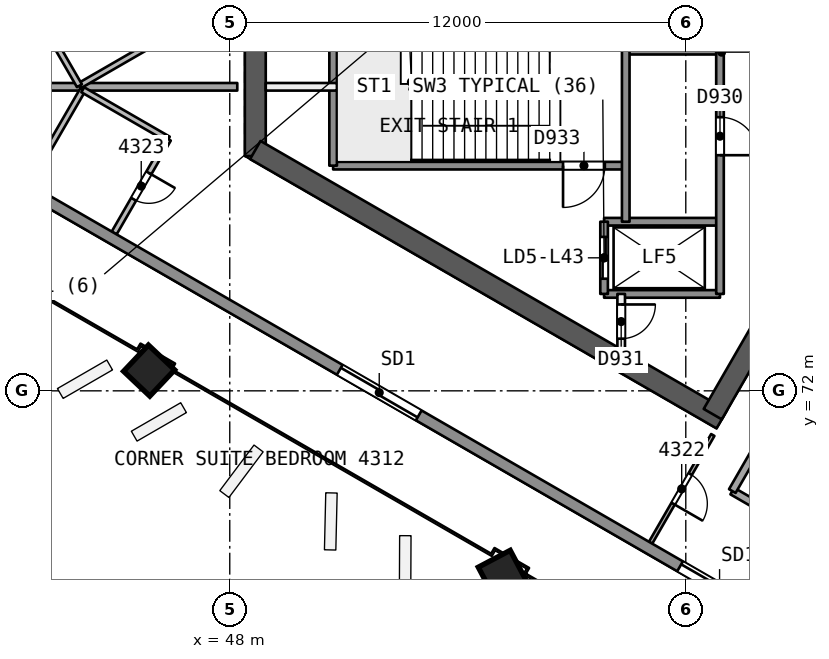
"""IFC4 building model, lengths in metres.
Left out: names, types, materials, properties, quantities, classifications, styles, units other than length and angle.
Written with IfcOpenShell. Run it as: python <this file> out.ifc"""

import sys

from ifc_helpers import new_model, si_unit, direction, frame, frame_2d, origin, origin_2d, place, context, subcontext, project, spatial, rectangle, extrude, element, fill, save


model = new_model("IFC4")
c1 = context("Model", 3, precision=1e-05, world=origin(), true_north=direction((0.0, 1.0)))
c2 = subcontext(c1, "Body", "Model", "MODEL_VIEW")
j1 = project(units=[si_unit("LENGTHUNIT", "METRE"), si_unit("PLANEANGLEUNIT", "RADIAN")], contexts=[c1])
p1 = place(None, origin())
s1 = spatial("IfcSite", under=j1, at=p1, CompositionType="ELEMENT")
p2 = place(p1, origin())
s2 = spatial("IfcBuilding", under=s1, at=p2, CompositionType="ELEMENT")
p3 = place(p2, frame((0.0, 0.0, 178.5)))
s3 = spatial("IfcBuildingStorey", under=s2, at=p3, CompositionType="ELEMENT", Elevation=178.5)
p4 = place(p3, frame((65.682, 80.0, 0.0), z_axis=(0.0, 0.0, 1.0), x_axis=(-0.500000202252, 0.866025287014, 0.0)))
e1 = element("IfcWall", 1, at=p4, inside=s3, PredefinedType="SHEAR", context=c2, shape_type="SweptSolid", body=[
    extrude(rectangle(XDim=10.221, YDim=0.55, at=frame_2d((5.111, 0.0))), origin(), (0.0, 0.0, 1.0), 3.7),
])
p5 = place(p4, frame((0.791, 0.0, 0.0)))
e2 = element("IfcOpeningElement", 2, at=p5, cuts=e1, PredefinedType="OPENING", context=c2, shape_type="SweptSolid", body=[
    extrude(rectangle(XDim=1.2, YDim=2.1, at=frame_2d((0.6, 1.05))), frame((0.0, 0.286, 0.0), z_axis=(0.0, -1.0, 0.0), x_axis=(1.0, 0.0, 0.0)), (0.0, 0.0, 1.0), 0.571),
])
p6 = place(p3, frame((48.672, 81.664, 0.0), z_axis=(0.0, 0.0, 1.0), x_axis=(0.0, -1.0, 0.0)))
e3 = element("IfcWall", 3, at=p6, inside=s3, PredefinedType="SHEAR", context=c2, shape_type="SweptSolid", body=[
    extrude(rectangle(XDim=3.487, YDim=0.55, at=frame_2d((1.743, 0.0))), origin(), (0.0, 0.0, 1.0), 3.7),
])
p7 = place(p3, frame((48.672, 78.336, 0.0), z_axis=(0.0, 0.0, 1.0), x_axis=(0.866023530946, -0.500003243837, 0.0)))
e4 = element("IfcWall", 4, at=p7, inside=s3, PredefinedType="SHEAR", context=c2, shape_type="SweptSolid", body=[
    extrude(rectangle(XDim=14.175, YDim=0.55, at=frame_2d((7.087, 0.0))), origin(), (0.0, 0.0, 1.0), 3.7),
])
p8 = place(p3, frame((60.709, 71.386, 0.0), z_axis=(0.0, 0.0, 1.0), x_axis=(0.500015938302, 0.866016201606, 0.0)))
e5 = element("IfcWall", 5, at=p8, inside=s3, PredefinedType="SHEAR", context=c2, shape_type="SweptSolid", body=[
    extrude(rectangle(XDim=10.105, YDim=0.55, at=frame_2d((5.053, 0.0))), origin(), (0.0, 0.0, 1.0), 3.7),
])
p9 = place(p8, frame((7.955, 0.0, 0.0)))
e6 = element("IfcOpeningElement", 6, at=p9, cuts=e5, PredefinedType="OPENING", context=c2, shape_type="SweptSolid", body=[
    extrude(rectangle(XDim=1.2, YDim=2.1, at=frame_2d((0.6, 1.05))), frame((0.0, 0.286, 0.0), z_axis=(0.0, -1.0, 0.0), x_axis=(1.0, 0.0, 0.0)), (0.0, 0.0, 1.0), 0.571),
])
p10 = place(p3, frame((45.844, 72.525, 0.0), z_axis=(0.02855911485, 0.006793507689, 0.999569019734), x_axis=(-0.865320906072, 0.500764600817, 0.021320039488)))
e7 = element("IfcColumn", 7, at=p10, inside=s3, PredefinedType="COLUMN", context=c2, shape_type="SweptSolid", body=[
    extrude(rectangle(XDim=0.95, YDim=0.95, at=origin_2d()), origin(), (0.0, 0.0, 1.0), 3.702),
])
p11 = place(p3, frame((55.159, 67.147, 0.0), z_axis=(0.019328516974, 0.012138044789, 0.999739504221), x_axis=(-0.865689041461, 0.500468616527, 0.010660551878)))
e8 = element("IfcColumn", 8, at=p11, inside=s3, PredefinedType="COLUMN", context=c2, shape_type="SweptSolid", body=[
    extrude(rectangle(XDim=0.95, YDim=0.95, at=origin_2d()), origin(), (0.0, 0.0, 1.0), 3.701),
])
p12 = place(p3, frame((46.296, 81.328, 0.0), z_axis=(0.0, 0.0, 1.0), x_axis=(-0.866021400173, -0.500006934395, 0.0)))
e9 = element("IfcWall", 9, at=p12, inside=s3, PredefinedType="PARTITIONING", context=c2, shape_type="SweptSolid", body=[
    extrude(rectangle(XDim=2.6, YDim=0.15, at=frame_2d((1.3, 0.0))), origin(), (0.0, 0.0, 1.0), 3.25),
])
p13 = place(p3, frame((44.045, 80.028, 0.0), z_axis=(0.0, 0.0, 1.0), x_axis=(-0.499960165064, 0.866048401274, 0.0)))
e10 = element("IfcWall", 10, at=p13, inside=s3, PredefinedType="PARTITIONING", context=c2, shape_type="SweptSolid", body=[
    extrude(rectangle(XDim=2.371, YDim=0.15, at=frame_2d((1.186, 0.0))), origin(), (0.0, 0.0, 1.0), 3.25),
])
p14 = place(p3, frame((42.859, 80.0, 0.0), z_axis=(0.0, 0.0, 1.0), x_axis=(1.0, 0.0, 0.0)))
e11 = element("IfcWall", 11, at=p14, inside=s3, PredefinedType="PARTITIONING", context=c2, shape_type="SweptSolid", body=[
    extrude(rectangle(XDim=5.339, YDim=0.2, at=frame_2d((2.669, 0.0))), origin(), (0.0, 0.0, 1.0), 3.25),
])
p15 = place(p3, frame((60.71, 70.838, 0.0), z_axis=(0.0, 0.0, 1.0), x_axis=(-0.499980647919, -0.866036576425, 0.0)))
e12 = element("IfcWall", 12, at=p15, inside=s3, PredefinedType="PARTITIONING", context=c2, shape_type="SweptSolid", body=[
    extrude(rectangle(XDim=3.274, YDim=0.1, at=frame_2d((1.637, 0.0))), origin(), (0.0, 0.0, 1.0), 3.25),
])
p16 = place(p15, frame((1.187, 0.0, 0.0)))
e13 = element("IfcOpeningElement", 13, at=p16, cuts=e12, PredefinedType="OPENING", context=c2, shape_type="SweptSolid", body=[
    extrude(rectangle(XDim=0.9, YDim=2.1, at=frame_2d((0.45, 1.05))), frame((0.0, 0.061, 0.0), z_axis=(0.0, -1.0, 0.0), x_axis=(1.0, 0.0, 0.0)), (0.0, 0.0, 1.0), 0.121),
])
p17 = place(p3, frame((62.956, 68.363, 0.0), z_axis=(0.0, 0.0, 1.0), x_axis=(-0.866041268327, 0.499972520799, 0.0)))
e14 = element("IfcWall", 14, at=p17, inside=s3, PredefinedType="PARTITIONING", context=c2, shape_type="SweptSolid", body=[
    extrude(rectangle(XDim=2.0, YDim=0.2, at=frame_2d((1.0, 0.0))), origin(), (0.0, 0.0, 1.0), 3.25),
])
p18 = place(p3, frame((61.224, 69.363, 0.0), z_axis=(0.0, 0.0, 1.0), x_axis=(0.499990139034, 0.866031096941, 0.0)))
e15 = element("IfcWall", 15, at=p18, inside=s3, PredefinedType="PARTITIONING", context=c2, shape_type="SweptSolid", body=[
    extrude(rectangle(XDim=9.0, YDim=0.2, at=frame_2d((4.5, 0.0))), origin(), (0.0, 0.0, 1.0), 3.25),
])
p19 = place(p3, frame((42.859, 77.718, 0.0), z_axis=(0.0, 0.0, 1.0), x_axis=(0.499935570486, 0.866062598986, 0.0)))
e16 = element("IfcWall", 16, at=p19, inside=s3, PredefinedType="PARTITIONING", context=c2, shape_type="SweptSolid", body=[
    extrude(rectangle(XDim=2.545, YDim=0.15, at=frame_2d((1.272, 0.0))), origin(), (0.0, 0.0, 1.0), 3.25),
])
p20 = place(p3, frame((44.132, 79.922, 0.0), z_axis=(0.0, 0.0, 1.0), x_axis=(0.866021400173, -0.500006934395, 0.0)))
e17 = element("IfcWall", 17, at=p20, inside=s3, PredefinedType="PARTITIONING", context=c2, shape_type="SweptSolid", body=[
    extrude(rectangle(XDim=2.6, YDim=0.15, at=frame_2d((1.3, 0.0))), origin(), (0.0, 0.0, 1.0), 3.25),
])
p21 = place(p3, frame((46.384, 78.622, 0.0), z_axis=(0.0, 0.0, 1.0), x_axis=(-0.500006551472, -0.866021621257, 0.0)))
e18 = element("IfcWall", 18, at=p21, inside=s3, PredefinedType="PARTITIONING", context=c2, shape_type="SweptSolid", body=[
    extrude(rectangle(XDim=2.852, YDim=0.15, at=frame_2d((1.426, 0.0))), origin(), (0.0, 0.0, 1.0), 3.25),
])
p22 = place(p21, frame((1.026, 0.0, 0.0)))
e19 = element("IfcOpeningElement", 19, at=p22, cuts=e18, PredefinedType="OPENING", context=c2, shape_type="SweptSolid", body=[
    extrude(rectangle(XDim=0.8, YDim=2.1, at=frame_2d((0.4, 1.05))), frame((0.0, 0.085, 0.0), z_axis=(0.0, -1.0, 0.0), x_axis=(1.0, 0.0, 0.0)), (0.0, 0.0, 1.0), 0.171),
])
p23 = place(p3, frame((88.788, 50.676, 0.0), z_axis=(0.0, 0.0, 1.0), x_axis=(-0.866026647012, 0.499997846661, 0.0)))
e20 = element("IfcWall", 20, at=p23, inside=s3, PredefinedType="SOLIDWALL", context=c2, shape_type="SweptSolid", body=[
    extrude(rectangle(XDim=53.206, YDim=0.3, at=frame_2d((26.603, 0.0))), origin(), (0.0, 0.0, 1.0), 3.25),
])
p24 = place(p23, frame((31.015, 0.0, 0.0)))
e21 = element("IfcOpeningElement", 21, at=p24, cuts=e20, PredefinedType="OPENING", context=c2, shape_type="SweptSolid", body=[
    extrude(rectangle(XDim=2.4, YDim=2.4, at=frame_2d((1.2, 1.2))), frame((0.0, 0.161, 0.0), z_axis=(0.0, -1.0, 0.0), x_axis=(1.0, 0.0, 0.0)), (0.0, 0.0, 1.0), 0.321),
])
p25 = place(p23, frame((41.356, 0.0, 0.0)))
e22 = element("IfcOpeningElement", 22, at=p25, cuts=e20, PredefinedType="OPENING", context=c2, shape_type="SweptSolid", body=[
    extrude(rectangle(XDim=2.4, YDim=2.4, at=frame_2d((1.2, 1.2))), frame((0.0, 0.161, 0.0), z_axis=(0.0, -1.0, 0.0), x_axis=(1.0, 0.0, 0.0)), (0.0, 0.0, 1.0), 0.321),
])
p26 = place(p23, frame((20.726, 0.0, 0.0)))
e23 = element("IfcOpeningElement", 23, at=p26, cuts=e20, PredefinedType="OPENING", context=c2, shape_type="SweptSolid", body=[
    extrude(rectangle(XDim=2.4, YDim=2.4, at=frame_2d((1.2, 1.2))), frame((0.0, 0.161, 0.0), z_axis=(0.0, -1.0, 0.0), x_axis=(1.0, 0.0, 0.0)), (0.0, 0.0, 1.0), 0.321),
])
p27 = place(p23, frame((9.4, 0.0, 0.0)))
e24 = element("IfcOpeningElement", 24, at=p27, cuts=e20, PredefinedType="OPENING", context=c2, shape_type="SweptSolid", body=[
    extrude(rectangle(XDim=2.4, YDim=2.4, at=frame_2d((1.2, 1.2))), frame((0.0, 0.161, 0.0), z_axis=(0.0, -1.0, 0.0), x_axis=(1.0, 0.0, 0.0)), (0.0, 0.0, 1.0), 0.321),
])
p28 = place(p23, frame((26.338, 0.0, 0.0)))
e25 = element("IfcOpeningElement", 25, at=p28, cuts=e20, PredefinedType="OPENING", context=c2, shape_type="SweptSolid", body=[
    extrude(rectangle(XDim=2.4, YDim=2.4, at=frame_2d((1.2, 1.2))), frame((0.0, 0.161, 0.0), z_axis=(0.0, -1.0, 0.0), x_axis=(1.0, 0.0, 0.0)), (0.0, 0.0, 1.0), 0.321),
])
p29 = place(p3, frame((60.9, 80.95, 0.0), z_axis=(0.0, 0.0, 1.0), x_axis=(-1.0, 0.0, 0.0)))
e26 = element("IfcWall", 26, at=p29, inside=s3, PredefinedType="SOLIDWALL", context=c2, shape_type="SweptSolid", body=[
    extrude(rectangle(XDim=2.48, YDim=0.2, at=frame_2d((1.24, 0.0))), origin(), (0.0, 0.0, 1.0), 3.25),
])
p30 = place(p3, frame((50.82, 80.0, 0.0), z_axis=(0.0, 0.0, 1.0), x_axis=(-1.0, 0.0, 0.0)))
e27 = element("IfcWall", 27, at=p30, inside=s3, PredefinedType="PARTITIONING", context=c2, shape_type="SweptSolid", body=[
    extrude(rectangle(XDim=1.873, YDim=0.2, at=frame_2d((0.937, 0.0))), origin(), (0.0, 0.0, 1.0), 3.25),
])
p31 = place(p3, frame((58.42, 77.925, 0.0), z_axis=(0.0, 0.0, 1.0), x_axis=(-1.0, 0.0, 0.0)))
e28 = element("IfcWall", 28, at=p31, inside=s3, PredefinedType="SOLIDWALL", context=c2, shape_type="SweptSolid", body=[
    extrude(rectangle(XDim=7.7, YDim=0.2, at=frame_2d((3.85, 0.0))), origin(), (0.0, 0.0, 1.0), 3.25),
])
p32 = place(p31, frame((0.55, 0.0, 0.0)))
e29 = element("IfcOpeningElement", 29, at=p32, cuts=e28, PredefinedType="OPENING", context=c2, shape_type="SweptSolid", body=[
    extrude(rectangle(XDim=1.1, YDim=2.1, at=frame_2d((0.55, 1.05))), frame((0.0, 0.11, 0.0), z_axis=(0.0, -1.0, 0.0), x_axis=(1.0, 0.0, 0.0)), (0.0, 0.0, 1.0), 0.221),
])
for number, where, z_axis, x_axis in (
    (30, (60.9, 76.45, 0.0), (0.0, 0.0, 1.0), (-1.0, 0.0, 0.0)),
    (31, (60.9, 74.55, 0.0), (0.0, 0.0, 1.0), (-1.0, 0.0, 0.0)),
):
    element("IfcWall", number, at=place(p3, frame(where, z_axis=z_axis, x_axis=x_axis)), inside=s3, PredefinedType="SOLIDWALL", context=c2, shape_type="SweptSolid", body=[
        extrude(rectangle(XDim=3.05, YDim=0.2, at=frame_2d((1.525, 0.0))), origin(), (0.0, 0.0, 1.0), 3.25),
    ])
p33 = place(p3, frame((60.9, 85.45, 0.0), z_axis=(0.0, 0.0, 1.0), x_axis=(0.0, -1.0, 0.0)))
e32 = element("IfcWall", 32, at=p33, inside=s3, PredefinedType="SOLIDWALL", context=c2, shape_type="SweptSolid", body=[
    extrude(rectangle(XDim=10.9, YDim=0.2, at=frame_2d((5.45, 0.0))), origin(), (0.0, 0.0, 1.0), 3.25),
])
p34 = place(p33, frame((0.625, 0.0, 0.0)))
e33 = element("IfcOpeningElement", 33, at=p34, cuts=e32, PredefinedType="OPENING", context=c2, shape_type="SweptSolid", body=[
    extrude(rectangle(XDim=1.0, YDim=2.1, at=frame_2d((0.5, 1.05))), frame((0.0, 0.11, 0.0), z_axis=(0.0, -1.0, 0.0), x_axis=(1.0, 0.0, 0.0)), (0.0, 0.0, 1.0), 0.221),
])
p35 = place(p33, frame((2.875, 0.0, 0.0)))
e34 = element("IfcOpeningElement", 34, at=p35, cuts=e32, PredefinedType="OPENING", context=c2, shape_type="SweptSolid", body=[
    extrude(rectangle(XDim=1.0, YDim=2.1, at=frame_2d((0.5, 1.05))), frame((0.0, 0.11, 0.0), z_axis=(0.0, -1.0, 0.0), x_axis=(1.0, 0.0, 0.0)), (0.0, 0.0, 1.0), 0.221),
])
p36 = place(p33, frame((6.25, 0.0, 0.0)))
e35 = element("IfcOpeningElement", 35, at=p36, cuts=e32, PredefinedType="OPENING", context=c2, shape_type="SweptSolid", body=[
    extrude(rectangle(XDim=1.0, YDim=2.1, at=frame_2d((0.5, 1.05))), frame((0.0, 0.11, 0.0), z_axis=(0.0, -1.0, 0.0), x_axis=(1.0, 0.0, 0.0)), (0.0, 0.0, 1.0), 0.221),
])
p37 = place(p3, frame((58.42, 86.974, 0.0), z_axis=(0.0, 0.0, 1.0), x_axis=(0.0, -1.0, 0.0)))
e36 = element("IfcWall", 36, at=p37, inside=s3, PredefinedType="SOLIDWALL", context=c2, shape_type="SweptSolid", body=[
    extrude(rectangle(XDim=10.524, YDim=0.2, at=frame_2d((5.262, 0.0))), origin(), (0.0, 0.0, 1.0), 3.25),
])
p38 = place(p37, frame((0.312, 0.0, 0.0)))
e37 = element("IfcOpeningElement", 37, at=p38, cuts=e36, PredefinedType="OPENING", context=c2, shape_type="SweptSolid", body=[
    extrude(rectangle(XDim=0.9, YDim=2.1, at=frame_2d((0.45, 1.05))), frame((0.0, 0.11, 0.0), z_axis=(0.0, -1.0, 0.0), x_axis=(1.0, 0.0, 0.0)), (0.0, 0.0, 1.0), 0.221),
])
p39 = place(p3, frame((58.3, 74.55, 0.0), z_axis=(0.0, 0.0, 1.0), x_axis=(0.0, -1.0, 0.0)))
e38 = element("IfcWall", 38, at=p39, inside=s3, PredefinedType="PARTITIONING", context=c2, shape_type="SweptSolid", body=[
    extrude(rectangle(XDim=1.455, YDim=0.2, at=frame_2d((0.728, 0.0))), origin(), (0.0, 0.0, 1.0), 3.25),
])
p40 = place(p39, frame((0.278, 0.0, 0.0)))
e39 = element("IfcOpeningElement", 39, at=p40, cuts=e38, PredefinedType="OPENING", context=c2, shape_type="SweptSolid", body=[
    extrude(rectangle(XDim=0.9, YDim=2.1, at=frame_2d((0.45, 1.05))), frame((0.0, 0.11, 0.0), z_axis=(0.0, -1.0, 0.0), x_axis=(1.0, 0.0, 0.0)), (0.0, 0.0, 1.0), 0.221),
])
p41 = place(p3, frame((57.85, 76.45, 0.0), z_axis=(0.0, 0.0, 1.0), x_axis=(0.0, -1.0, 0.0)))
e40 = element("IfcWall", 40, at=p41, inside=s3, PredefinedType="SOLIDWALL", context=c2, shape_type="SweptSolid", body=[
    extrude(rectangle(XDim=1.9, YDim=0.2, at=frame_2d((0.95, 0.0))), origin(), (0.0, 0.0, 1.0), 3.25),
])
p42 = place(p41, frame((0.4, 0.0, 0.0)))
e41 = element("IfcOpeningElement", 41, at=p42, cuts=e40, PredefinedType="OPENING", context=c2, shape_type="SweptSolid", body=[
    extrude(rectangle(XDim=1.1, YDim=2.1, at=frame_2d((0.55, 1.05))), frame((0.0, 0.11, 0.0), z_axis=(0.0, -1.0, 0.0), x_axis=(1.0, 0.0, 0.0)), (0.0, 0.0, 1.0), 0.221),
])
p43 = place(p3, frame((50.72, 82.075, 0.0), z_axis=(0.0, 0.0, 1.0), x_axis=(0.0, -1.0, 0.0)))
e42 = element("IfcWall", 42, at=p43, inside=s3, PredefinedType="SOLIDWALL", context=c2, shape_type="SweptSolid", body=[
    extrude(rectangle(XDim=4.15, YDim=0.2, at=frame_2d((2.075, 0.0))), origin(), (0.0, 0.0, 1.0), 3.25),
])
p44 = place(p16, origin())
e43 = element("IfcDoor", 43, at=p44, inside=s3, OperationType="SINGLE_SWING_RIGHT", PredefinedType="NOTDEFINED", context=c2, shape_type="SweptSolid", body=[
    extrude(rectangle(XDim=0.9, YDim=2.1, at=frame_2d((0.45, 1.05))), frame((0.0, 0.025, 0.0), z_axis=(0.0, -1.0, 0.0), x_axis=(1.0, 0.0, 0.0)), (0.0, 0.0, 1.0), 0.05),
])
fill(e13, e43)
p45 = place(p22, origin())
e44 = element("IfcDoor", 44, at=p45, inside=s3, OperationType="SINGLE_SWING_LEFT", PredefinedType="NOTDEFINED", context=c2, shape_type="SweptSolid", body=[
    extrude(rectangle(XDim=0.8, YDim=2.1, at=frame_2d((0.4, 1.05))), frame((0.0, 0.025, 0.0), z_axis=(0.0, -1.0, 0.0), x_axis=(1.0, 0.0, 0.0)), (0.0, 0.0, 1.0), 0.05),
])
fill(e19, e44)
p46 = place(p24, origin())
e45 = element("IfcDoor", 45, at=p46, inside=s3, OperationType="SLIDING_TO_LEFT", PredefinedType="NOTDEFINED", context=c2, shape_type="SweptSolid", body=[
    extrude(rectangle(XDim=2.4, YDim=2.4, at=frame_2d((1.2, 1.2))), frame((0.0, 0.025, 0.0), z_axis=(0.0, -1.0, 0.0), x_axis=(1.0, 0.0, 0.0)), (0.0, 0.0, 1.0), 0.05),
])
fill(e21, e45)
p47 = place(p25, origin())
e46 = element("IfcDoor", 46, at=p47, inside=s3, OperationType="SLIDING_TO_RIGHT", PredefinedType="NOTDEFINED", context=c2, shape_type="SweptSolid", body=[
    extrude(rectangle(XDim=2.4, YDim=2.4, at=frame_2d((1.2, 1.2))), frame((0.0, 0.025, 0.0), z_axis=(0.0, -1.0, 0.0), x_axis=(1.0, 0.0, 0.0)), (0.0, 0.0, 1.0), 0.05),
])
fill(e22, e46)
p48 = place(p42, origin())
e47 = element("IfcDoor", 47, at=p48, inside=s3, OperationType="SLIDING_TO_RIGHT", PredefinedType="NOTDEFINED", context=c2, shape_type="SweptSolid", body=[
    extrude(rectangle(XDim=1.1, YDim=2.1, at=frame_2d((0.55, 1.05))), frame((0.0, 0.025, 0.0), z_axis=(0.0, -1.0, 0.0), x_axis=(1.0, 0.0, 0.0)), (0.0, 0.0, 1.0), 0.05),
])
fill(e41, e47)
p49 = place(p36, origin())
e48 = element("IfcDoor", 48, at=p49, inside=s3, OperationType="SINGLE_SWING_RIGHT", PredefinedType="NOTDEFINED", context=c2, shape_type="SweptSolid", body=[
    extrude(rectangle(XDim=1.0, YDim=2.1, at=frame_2d((0.5, 1.05))), frame((0.0, 0.025, 0.0), z_axis=(0.0, -1.0, 0.0), x_axis=(1.0, 0.0, 0.0)), (0.0, 0.0, 1.0), 0.05),
])
fill(e35, e48)
p50 = place(p40, origin())
e49 = element("IfcDoor", 49, at=p50, inside=s3, OperationType="SINGLE_SWING_LEFT", PredefinedType="NOTDEFINED", context=c2, shape_type="SweptSolid", body=[
    extrude(rectangle(XDim=0.9, YDim=2.1, at=frame_2d((0.45, 1.05))), frame((0.0, 0.025, 0.0), z_axis=(0.0, -1.0, 0.0), x_axis=(1.0, 0.0, 0.0)), (0.0, 0.0, 1.0), 0.05),
])
fill(e39, e49)
p51 = place(p32, origin())
e50 = element("IfcDoor", 50, at=p51, inside=s3, OperationType="SINGLE_SWING_RIGHT", PredefinedType="NOTDEFINED", context=c2, shape_type="SweptSolid", body=[
    extrude(rectangle(XDim=1.1, YDim=2.1, at=frame_2d((0.55, 1.05))), frame((0.0, 0.025, 0.0), z_axis=(0.0, -1.0, 0.0), x_axis=(1.0, 0.0, 0.0)), (0.0, 0.0, 1.0), 0.05),
])
fill(e29, e50)
save(model, sys.argv[1])
